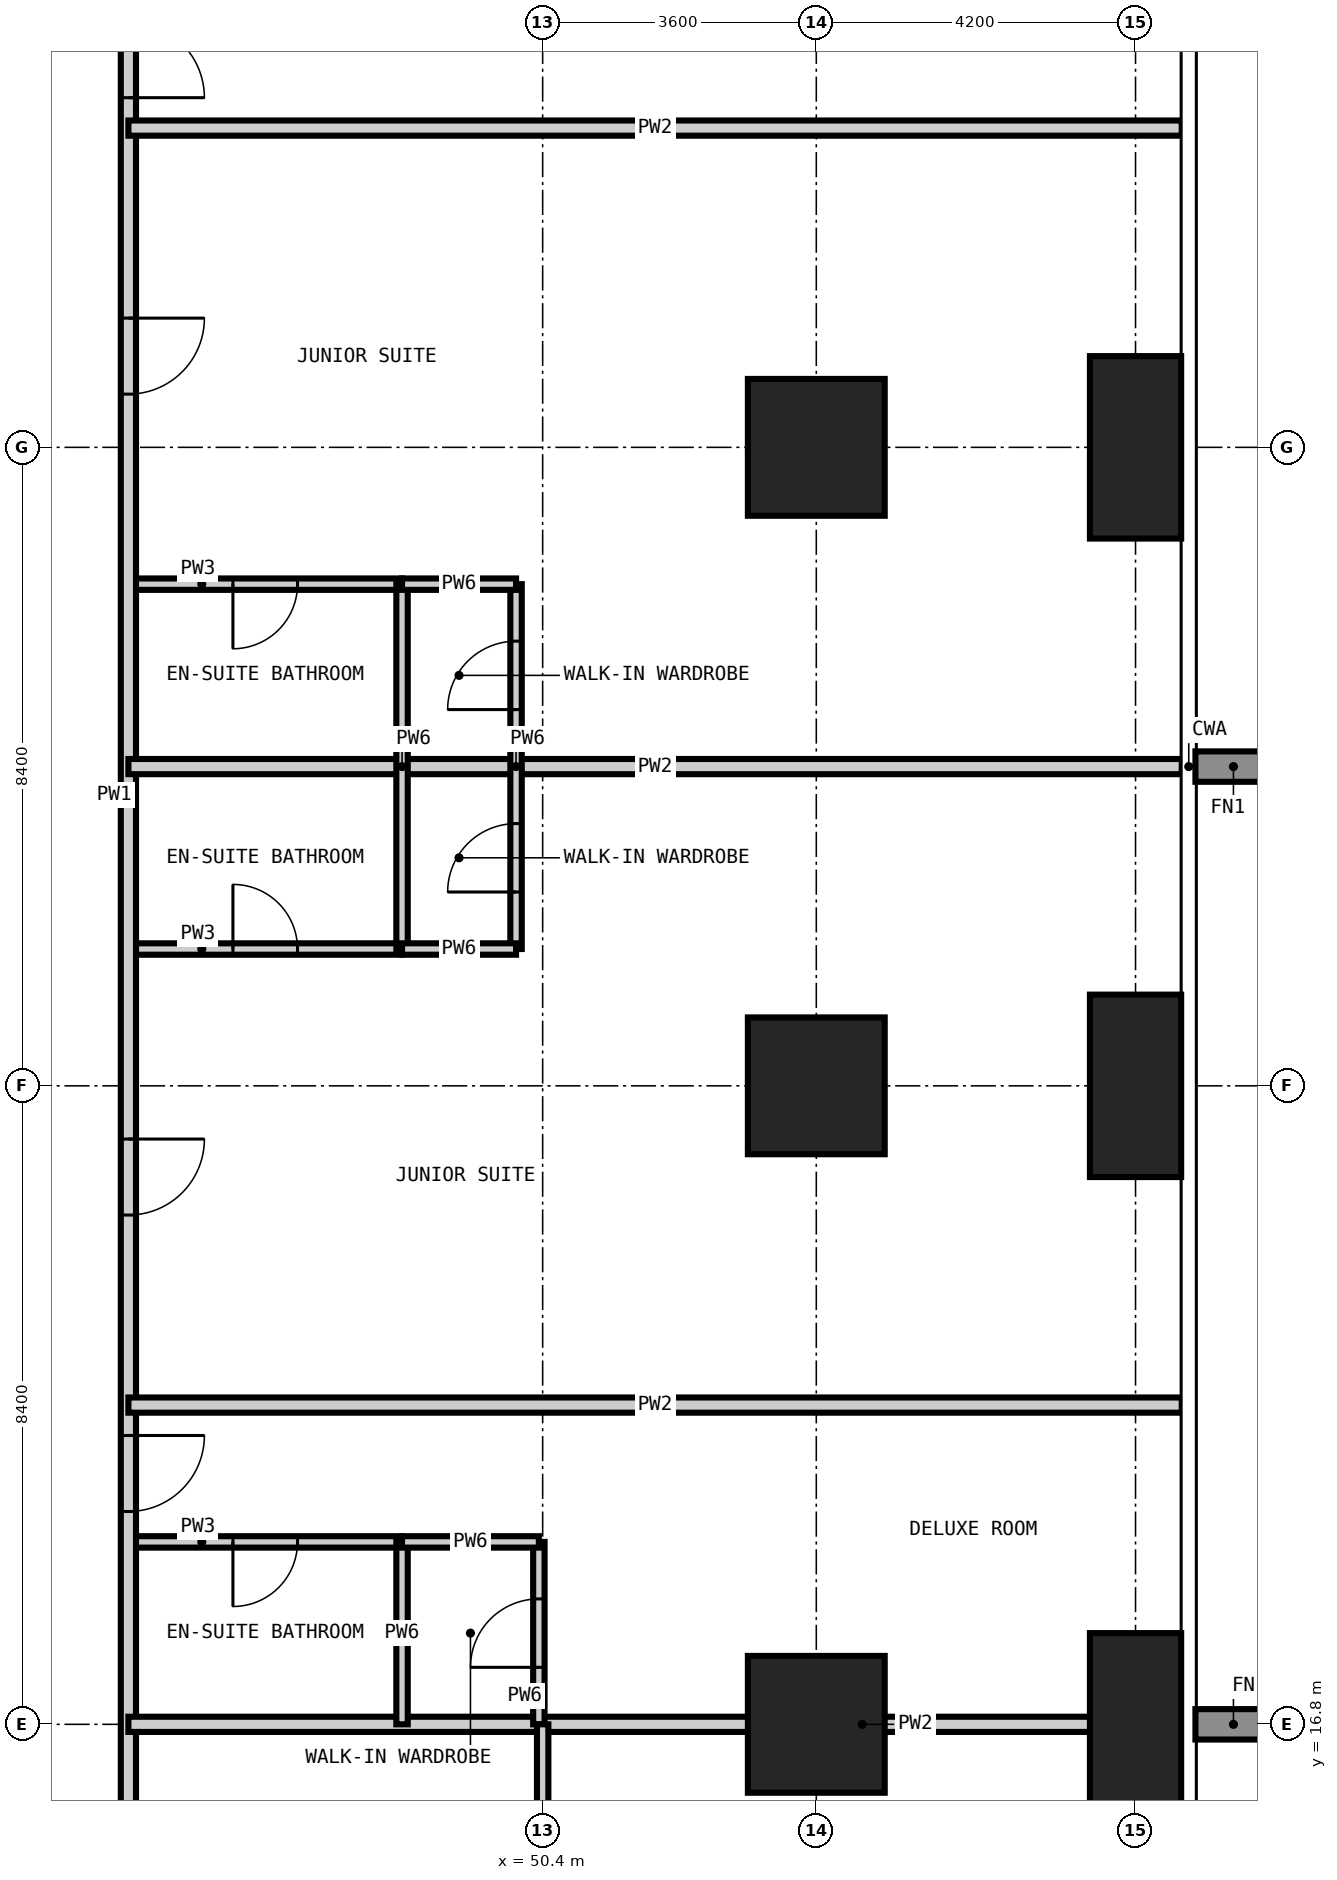
"""IFC4 building model, lengths in metres.
Left out: names, types, materials, properties, quantities, classifications, styles, units other than length and angle.
Written with IfcOpenShell. Run it as: python <this file> out.ifc"""

import sys

from ifc_helpers import new_model, si_unit, direction, frame, frame_2d, origin, origin_2d, place, context, subcontext, project, spatial, rectangle, extrude, element, fill, save


model = new_model("IFC4")
c1 = context("Model", 3, precision=1e-05, world=origin(), true_north=direction((0.0, 1.0)))
c2 = subcontext(c1, "Body", "Model", "MODEL_VIEW")
j1 = project(units=[si_unit("LENGTHUNIT", "METRE"), si_unit("PLANEANGLEUNIT", "RADIAN")], contexts=[c1])
p1 = place(None, origin())
s1 = spatial("IfcSite", under=j1, at=p1, CompositionType="ELEMENT")
p2 = place(p1, origin())
s2 = spatial("IfcBuilding", under=s1, at=p2, CompositionType="ELEMENT")
p3 = place(p2, frame((0.0, 0.0, 70.2)))
s3 = spatial("IfcBuildingStorey", under=s2, at=p3, CompositionType="ELEMENT", Elevation=70.2)
for number, where, z_axis, x_axis in (
    (1, (54.0, 16.8, -0.35), (0.0, 0.0, 1.0), (1.0, 0.0, 0.0)),
    (2, (54.0, 25.2, -0.35), (0.0, 0.0, 1.0), (1.0, 0.0, 0.0)),
    (3, (54.0, 33.6, -0.35), (0.0, 0.0, 1.0), (1.0, 0.0, 0.0)),
):
    element("IfcColumn", number, at=place(p3, frame(where, z_axis=z_axis, x_axis=x_axis)), inside=s3, PredefinedType="COLUMN", context=c2, shape_type="SweptSolid", body=[
        extrude(rectangle(XDim=1.8, YDim=1.8, at=origin_2d()), origin(), (0.0, 0.0, 1.0), 3.6),
    ])
for number, where, z_axis, x_axis in (
    (4, (58.2, 16.8, -0.35), (0.0, 0.0, 1.0), (1.0, 0.0, 0.0)),
    (5, (58.2, 25.2, -0.35), (0.0, 0.0, 1.0), (1.0, 0.0, 0.0)),
    (6, (58.2, 33.6, -0.35), (0.0, 0.0, 1.0), (1.0, 0.0, 0.0)),
):
    element("IfcColumn", number, at=place(p3, frame(where, z_axis=z_axis, x_axis=x_axis)), inside=s3, PredefinedType="COLUMN", context=c2, shape_type="SweptSolid", body=[
        extrude(rectangle(XDim=1.2, YDim=2.4, at=origin_2d()), origin(), (0.0, 0.0, 1.0), 3.6),
    ])
p4 = place(p3, frame((44.95, 19.2, 0.0), z_axis=(0.0, 0.0, 1.0), x_axis=(1.0, 0.0, 0.0)))
e7 = element("IfcWall", 7, at=p4, inside=s3, PredefinedType="PARTITIONING", context=c2, shape_type="SweptSolid", body=[
    extrude(rectangle(XDim=3.6, YDim=0.15, at=frame_2d((1.8, 0.0))), origin(), (0.0, 0.0, 1.0), 3.25),
])
p5 = place(p4, frame((1.375, 0.0, 0.0)))
e8 = element("IfcOpeningElement", 8, at=p5, cuts=e7, PredefinedType="OPENING", context=c2, shape_type="SweptSolid", body=[
    extrude(rectangle(XDim=0.85, YDim=2.1, at=frame_2d((0.425, 1.05))), frame((0.0, 0.085, 0.0), z_axis=(0.0, -1.0, 0.0), x_axis=(1.0, 0.0, 0.0)), (0.0, 0.0, 1.0), 0.17),
])
p6 = place(p3, frame((44.95, 27.0, 0.0), z_axis=(0.0, 0.0, 1.0), x_axis=(1.0, 0.0, 0.0)))
e9 = element("IfcWall", 9, at=p6, inside=s3, PredefinedType="PARTITIONING", context=c2, shape_type="SweptSolid", body=[
    extrude(rectangle(XDim=3.6, YDim=0.15, at=frame_2d((1.8, 0.0))), origin(), (0.0, 0.0, 1.0), 3.25),
])
p7 = place(p6, frame((1.375, 0.0, 0.0)))
e10 = element("IfcOpeningElement", 10, at=p7, cuts=e9, PredefinedType="OPENING", context=c2, shape_type="SweptSolid", body=[
    extrude(rectangle(XDim=0.85, YDim=2.1, at=frame_2d((0.425, 1.05))), frame((0.0, 0.085, 0.0), z_axis=(0.0, -1.0, 0.0), x_axis=(1.0, 0.0, 0.0)), (0.0, 0.0, 1.0), 0.17),
])
p8 = place(p3, frame((44.95, 31.8, 0.0), z_axis=(0.0, 0.0, 1.0), x_axis=(1.0, 0.0, 0.0)))
e11 = element("IfcWall", 11, at=p8, inside=s3, PredefinedType="PARTITIONING", context=c2, shape_type="SweptSolid", body=[
    extrude(rectangle(XDim=3.6, YDim=0.15, at=frame_2d((1.8, 0.0))), origin(), (0.0, 0.0, 1.0), 3.25),
])
p9 = place(p8, frame((1.375, 0.0, 0.0)))
e12 = element("IfcOpeningElement", 12, at=p9, cuts=e11, PredefinedType="OPENING", context=c2, shape_type="SweptSolid", body=[
    extrude(rectangle(XDim=0.85, YDim=2.1, at=frame_2d((0.425, 1.05))), frame((0.0, 0.085, 0.0), z_axis=(0.0, -1.0, 0.0), x_axis=(1.0, 0.0, 0.0)), (0.0, 0.0, 1.0), 0.17),
])
p10 = place(p3, frame((44.95, 45.55, 0.0), z_axis=(0.0, 0.0, 1.0), x_axis=(0.0, -1.0, 0.0)))
e13 = element("IfcWall", 13, at=p10, inside=s3, PredefinedType="PARTITIONING", context=c2, shape_type="SweptSolid", body=[
    extrude(rectangle(XDim=32.9, YDim=0.2, at=frame_2d((16.45, 0.0))), origin(), (0.0, 0.0, 1.0), 3.25),
])
p11 = place(p10, frame((24.95, 0.0, 0.0)))
e14 = element("IfcOpeningElement", 14, at=p11, cuts=e13, PredefinedType="OPENING", context=c2, shape_type="SweptSolid", body=[
    extrude(rectangle(XDim=1.0, YDim=2.2, at=frame_2d((0.5, 1.1))), frame((0.0, 0.11, 0.0), z_axis=(0.0, -1.0, 0.0), x_axis=(1.0, 0.0, 0.0)), (0.0, 0.0, 1.0), 0.22),
])
p12 = place(p10, frame((21.05, 0.0, 0.0)))
e15 = element("IfcOpeningElement", 15, at=p12, cuts=e13, PredefinedType="OPENING", context=c2, shape_type="SweptSolid", body=[
    extrude(rectangle(XDim=1.0, YDim=2.2, at=frame_2d((0.5, 1.1))), frame((0.0, 0.11, 0.0), z_axis=(0.0, -1.0, 0.0), x_axis=(1.0, 0.0, 0.0)), (0.0, 0.0, 1.0), 0.22),
])
p13 = place(p10, frame((10.25, 0.0, 0.0)))
e16 = element("IfcOpeningElement", 16, at=p13, cuts=e13, PredefinedType="OPENING", context=c2, shape_type="SweptSolid", body=[
    extrude(rectangle(XDim=1.0, YDim=2.2, at=frame_2d((0.5, 1.1))), frame((0.0, 0.11, 0.0), z_axis=(0.0, -1.0, 0.0), x_axis=(1.0, 0.0, 0.0)), (0.0, 0.0, 1.0), 0.22),
])
p14 = place(p10, frame((6.35, 0.0, 0.0)))
e17 = element("IfcOpeningElement", 17, at=p14, cuts=e13, PredefinedType="OPENING", context=c2, shape_type="SweptSolid", body=[
    extrude(rectangle(XDim=1.0, YDim=2.2, at=frame_2d((0.5, 1.1))), frame((0.0, 0.11, 0.0), z_axis=(0.0, -1.0, 0.0), x_axis=(1.0, 0.0, 0.0)), (0.0, 0.0, 1.0), 0.22),
])
p15 = place(p10, frame((30.325, 0.0, 0.0)))
e18 = element("IfcOpeningElement", 18, at=p15, cuts=e13, PredefinedType="OPENING", context=c2, shape_type="SweptSolid", body=[
    extrude(rectangle(XDim=1.0, YDim=2.2, at=frame_2d((0.5, 1.1))), frame((0.0, 0.11, 0.0), z_axis=(0.0, -1.0, 0.0), x_axis=(1.0, 0.0, 0.0)), (0.0, 0.0, 1.0), 0.22),
])
p16 = place(p10, frame((1.275, 0.0, 0.0)))
e19 = element("IfcOpeningElement", 19, at=p16, cuts=e13, PredefinedType="OPENING", context=c2, shape_type="SweptSolid", body=[
    extrude(rectangle(XDim=1.0, YDim=2.2, at=frame_2d((0.5, 1.1))), frame((0.0, 0.11, 0.0), z_axis=(0.0, -1.0, 0.0), x_axis=(1.0, 0.0, 0.0)), (0.0, 0.0, 1.0), 0.22),
])
p17 = place(p3, frame((44.95, 16.8, 0.0), z_axis=(0.0, 0.0, 1.0), x_axis=(1.0, 0.0, 0.0)))
e20 = element("IfcWall", 20, at=p17, inside=s3, PredefinedType="PARTITIONING", context=c2, shape_type="SweptSolid", body=[
    extrude(rectangle(XDim=5.4, YDim=0.2, at=frame_2d((2.7, 0.0))), origin(), (0.0, 0.0, 1.0), 3.25),
])
p18 = place(p3, frame((50.4, 16.8, 0.0), z_axis=(0.0, 0.0, 1.0), x_axis=(1.0, 0.0, 0.0)))
e21 = element("IfcWall", 21, at=p18, inside=s3, PredefinedType="PARTITIONING", context=c2, shape_type="SweptSolid", body=[
    extrude(rectangle(XDim=8.408, YDim=0.2, at=frame_2d((4.204, 0.0))), origin(), (0.0, 0.0, 1.0), 3.25),
])
for number, where, z_axis, x_axis in (
    (22, (44.95, 21.0, 0.0), (0.0, 0.0, 1.0), (1.0, 0.0, 0.0)),
    (23, (44.95, 29.4, 0.0), (0.0, 0.0, 1.0), (1.0, 0.0, 0.0)),
    (24, (44.95, 37.8, 0.0), (0.0, 0.0, 1.0), (1.0, 0.0, 0.0)),
):
    element("IfcWall", number, at=place(p3, frame(where, z_axis=z_axis, x_axis=x_axis)), inside=s3, PredefinedType="PARTITIONING", context=c2, shape_type="SweptSolid", body=[
        extrude(rectangle(XDim=13.858, YDim=0.2, at=frame_2d((6.929, 0.0))), origin(), (0.0, 0.0, 1.0), 3.25),
    ])
p19 = place(p3, frame((48.55, 16.8, 0.0), z_axis=(0.0, 0.0, 1.0), x_axis=(0.0, 1.0, 0.0)))
e25 = element("IfcWall", 25, at=p19, inside=s3, PredefinedType="PARTITIONING", context=c2, shape_type="SweptSolid", body=[
    extrude(rectangle(XDim=2.4, YDim=0.15, at=frame_2d((1.2, 0.0))), origin(), (0.0, 0.0, 1.0), 3.25),
])
p20 = place(p3, frame((48.55, 27.0, 0.0), z_axis=(0.0, 0.0, 1.0), x_axis=(0.0, 1.0, 0.0)))
e26 = element("IfcWall", 26, at=p20, inside=s3, PredefinedType="PARTITIONING", context=c2, shape_type="SweptSolid", body=[
    extrude(rectangle(XDim=4.8, YDim=0.15, at=frame_2d((2.4, 0.0))), origin(), (0.0, 0.0, 1.0), 3.25),
])
p21 = place(p3, frame((50.05, 27.0, 0.0), z_axis=(0.0, 0.0, 1.0), x_axis=(0.0, 1.0, 0.0)))
e27 = element("IfcWall", 27, at=p21, inside=s3, PredefinedType="PARTITIONING", context=c2, shape_type="SweptSolid", body=[
    extrude(rectangle(XDim=4.8, YDim=0.15, at=frame_2d((2.4, 0.0))), origin(), (0.0, 0.0, 1.0), 3.25),
])
p22 = place(p21, frame((0.75, 0.0, 0.0)))
e28 = element("IfcOpeningElement", 28, at=p22, cuts=e27, PredefinedType="OPENING", context=c2, shape_type="SweptSolid", body=[
    extrude(rectangle(XDim=0.9, YDim=2.1, at=frame_2d((0.45, 1.05))), frame((0.0, 0.085, 0.0), z_axis=(0.0, -1.0, 0.0), x_axis=(1.0, 0.0, 0.0)), (0.0, 0.0, 1.0), 0.17),
])
p23 = place(p21, frame((3.15, 0.0, 0.0)))
e29 = element("IfcOpeningElement", 29, at=p23, cuts=e27, PredefinedType="OPENING", context=c2, shape_type="SweptSolid", body=[
    extrude(rectangle(XDim=0.9, YDim=2.1, at=frame_2d((0.45, 1.05))), frame((0.0, 0.085, 0.0), z_axis=(0.0, -1.0, 0.0), x_axis=(1.0, 0.0, 0.0)), (0.0, 0.0, 1.0), 0.17),
])
p24 = place(p3, frame((50.35, 16.8, 0.0), z_axis=(0.0, 0.0, 1.0), x_axis=(0.0, 1.0, 0.0)))
e30 = element("IfcWall", 30, at=p24, inside=s3, PredefinedType="PARTITIONING", context=c2, shape_type="SweptSolid", body=[
    extrude(rectangle(XDim=2.4, YDim=0.15, at=frame_2d((1.2, 0.0))), origin(), (0.0, 0.0, 1.0), 3.25),
])
p25 = place(p24, frame((0.75, 0.0, 0.0)))
e31 = element("IfcOpeningElement", 31, at=p25, cuts=e30, PredefinedType="OPENING", context=c2, shape_type="SweptSolid", body=[
    extrude(rectangle(XDim=0.9, YDim=2.1, at=frame_2d((0.45, 1.05))), frame((0.0, 0.085, 0.0), z_axis=(0.0, -1.0, 0.0), x_axis=(1.0, 0.0, 0.0)), (0.0, 0.0, 1.0), 0.17),
])
p26 = place(p3, frame((50.4, -0.008, 0.0), z_axis=(0.0, 0.0, 1.0), x_axis=(0.0, 1.0, 0.0)))
e32 = element("IfcWall", 32, at=p26, inside=s3, PredefinedType="PARTITIONING", context=c2, shape_type="SweptSolid", body=[
    extrude(rectangle(XDim=16.808, YDim=0.15, at=frame_2d((8.404, 0.0))), origin(), (0.0, 0.0, 1.0), 3.25),
])
p27 = place(p26, frame((1.958, 0.0, 0.0)))
e33 = element("IfcOpeningElement", 33, at=p27, cuts=e32, PredefinedType="OPENING", context=c2, shape_type="SweptSolid", body=[
    extrude(rectangle(XDim=0.9, YDim=2.1, at=frame_2d((0.45, 1.05))), frame((0.0, 0.085, 0.0), z_axis=(0.0, -1.0, 0.0), x_axis=(1.0, 0.0, 0.0)), (0.0, 0.0, 1.0), 0.17),
])
p28 = place(p26, frame((12.158, 0.0, 0.0)))
e34 = element("IfcOpeningElement", 34, at=p28, cuts=e32, PredefinedType="OPENING", context=c2, shape_type="SweptSolid", body=[
    extrude(rectangle(XDim=0.9, YDim=2.1, at=frame_2d((0.45, 1.05))), frame((0.0, 0.085, 0.0), z_axis=(0.0, -1.0, 0.0), x_axis=(1.0, 0.0, 0.0)), (0.0, 0.0, 1.0), 0.17),
])
p29 = place(p3, frame((48.55, 19.2, 0.0), z_axis=(0.0, 0.0, 1.0), x_axis=(1.0, 0.0, 0.0)))
e35 = element("IfcWall", 35, at=p29, inside=s3, PredefinedType="PARTITIONING", context=c2, shape_type="SweptSolid", body=[
    extrude(rectangle(XDim=1.8, YDim=0.15, at=frame_2d((0.9, 0.0))), origin(), (0.0, 0.0, 1.0), 3.25),
])
for number, where, z_axis, x_axis in (
    (36, (48.55, 27.0, 0.0), (0.0, 0.0, 1.0), (1.0, 0.0, 0.0)),
    (37, (48.55, 31.8, 0.0), (0.0, 0.0, 1.0), (1.0, 0.0, 0.0)),
):
    element("IfcWall", number, at=place(p3, frame(where, z_axis=z_axis, x_axis=x_axis)), inside=s3, PredefinedType="PARTITIONING", context=c2, shape_type="SweptSolid", body=[
        extrude(rectangle(XDim=1.5, YDim=0.15, at=frame_2d((0.75, 0.0))), origin(), (0.0, 0.0, 1.0), 3.25),
    ])
p30 = place(p11, origin())
e38 = element("IfcDoor", 38, at=p30, inside=s3, OperationType="SINGLE_SWING_LEFT", PredefinedType="DOOR", context=c2, shape_type="SweptSolid", body=[
    extrude(rectangle(XDim=1.0, YDim=2.2, at=frame_2d((0.5, 1.1))), frame((0.0, 0.025, 0.0), z_axis=(0.0, -1.0, 0.0), x_axis=(1.0, 0.0, 0.0)), (0.0, 0.0, 1.0), 0.05),
])
fill(e14, e38)
p31 = place(p5, frame((0.85, 0.0, 0.0), z_axis=(0.0, 0.0, 1.0), x_axis=(-1.0, 0.0, 0.0)))
e39 = element("IfcDoor", 39, at=p31, inside=s3, OperationType="SINGLE_SWING_RIGHT", PredefinedType="DOOR", context=c2, shape_type="SweptSolid", body=[
    extrude(rectangle(XDim=0.85, YDim=2.1, at=frame_2d((0.425, 1.05))), frame((0.0, 0.025, 0.0), z_axis=(0.0, -1.0, 0.0), x_axis=(1.0, 0.0, 0.0)), (0.0, 0.0, 1.0), 0.05),
])
fill(e8, e39)
p32 = place(p25, origin())
e40 = element("IfcDoor", 40, at=p32, inside=s3, OperationType="SINGLE_SWING_LEFT", PredefinedType="DOOR", context=c2, shape_type="SweptSolid", body=[
    extrude(rectangle(XDim=0.9, YDim=2.1, at=frame_2d((0.45, 1.05))), frame((0.0, 0.025, 0.0), z_axis=(0.0, -1.0, 0.0), x_axis=(1.0, 0.0, 0.0)), (0.0, 0.0, 1.0), 0.05),
])
fill(e31, e40)
p33 = place(p12, origin())
e41 = element("IfcDoor", 41, at=p33, inside=s3, OperationType="SINGLE_SWING_LEFT", PredefinedType="DOOR", context=c2, shape_type="SweptSolid", body=[
    extrude(rectangle(XDim=1.0, YDim=2.2, at=frame_2d((0.5, 1.1))), frame((0.0, 0.025, 0.0), z_axis=(0.0, -1.0, 0.0), x_axis=(1.0, 0.0, 0.0)), (0.0, 0.0, 1.0), 0.05),
])
fill(e15, e41)
p34 = place(p7, origin())
e42 = element("IfcDoor", 42, at=p34, inside=s3, OperationType="SINGLE_SWING_LEFT", PredefinedType="DOOR", context=c2, shape_type="SweptSolid", body=[
    extrude(rectangle(XDim=0.85, YDim=2.1, at=frame_2d((0.425, 1.05))), frame((0.0, 0.025, 0.0), z_axis=(0.0, -1.0, 0.0), x_axis=(1.0, 0.0, 0.0)), (0.0, 0.0, 1.0), 0.05),
])
fill(e10, e42)
p35 = place(p22, origin())
e43 = element("IfcDoor", 43, at=p35, inside=s3, OperationType="SINGLE_SWING_LEFT", PredefinedType="DOOR", context=c2, shape_type="SweptSolid", body=[
    extrude(rectangle(XDim=0.9, YDim=2.1, at=frame_2d((0.45, 1.05))), frame((0.0, 0.025, 0.0), z_axis=(0.0, -1.0, 0.0), x_axis=(1.0, 0.0, 0.0)), (0.0, 0.0, 1.0), 0.05),
])
fill(e28, e43)
p36 = place(p13, origin())
e44 = element("IfcDoor", 44, at=p36, inside=s3, OperationType="SINGLE_SWING_LEFT", PredefinedType="DOOR", context=c2, shape_type="SweptSolid", body=[
    extrude(rectangle(XDim=1.0, YDim=2.2, at=frame_2d((0.5, 1.1))), frame((0.0, 0.025, 0.0), z_axis=(0.0, -1.0, 0.0), x_axis=(1.0, 0.0, 0.0)), (0.0, 0.0, 1.0), 0.05),
])
fill(e16, e44)
p37 = place(p9, frame((0.85, 0.0, 0.0), z_axis=(0.0, 0.0, 1.0), x_axis=(-1.0, 0.0, 0.0)))
e45 = element("IfcDoor", 45, at=p37, inside=s3, OperationType="SINGLE_SWING_RIGHT", PredefinedType="DOOR", context=c2, shape_type="SweptSolid", body=[
    extrude(rectangle(XDim=0.85, YDim=2.1, at=frame_2d((0.425, 1.05))), frame((0.0, 0.025, 0.0), z_axis=(0.0, -1.0, 0.0), x_axis=(1.0, 0.0, 0.0)), (0.0, 0.0, 1.0), 0.05),
])
fill(e12, e45)
p38 = place(p23, origin())
e46 = element("IfcDoor", 46, at=p38, inside=s3, OperationType="SINGLE_SWING_LEFT", PredefinedType="DOOR", context=c2, shape_type="SweptSolid", body=[
    extrude(rectangle(XDim=0.9, YDim=2.1, at=frame_2d((0.45, 1.05))), frame((0.0, 0.025, 0.0), z_axis=(0.0, -1.0, 0.0), x_axis=(1.0, 0.0, 0.0)), (0.0, 0.0, 1.0), 0.05),
])
fill(e29, e46)
p39 = place(p14, origin())
e47 = element("IfcDoor", 47, at=p39, inside=s3, OperationType="SINGLE_SWING_RIGHT", PredefinedType="DOOR", context=c2, shape_type="SweptSolid", body=[
    extrude(rectangle(XDim=1.0, YDim=2.2, at=frame_2d((0.5, 1.1))), frame((0.0, 0.025, 0.0), z_axis=(0.0, -1.0, 0.0), x_axis=(1.0, 0.0, 0.0)), (0.0, 0.0, 1.0), 0.05),
])
fill(e17, e47)
save(model, sys.argv[1])
